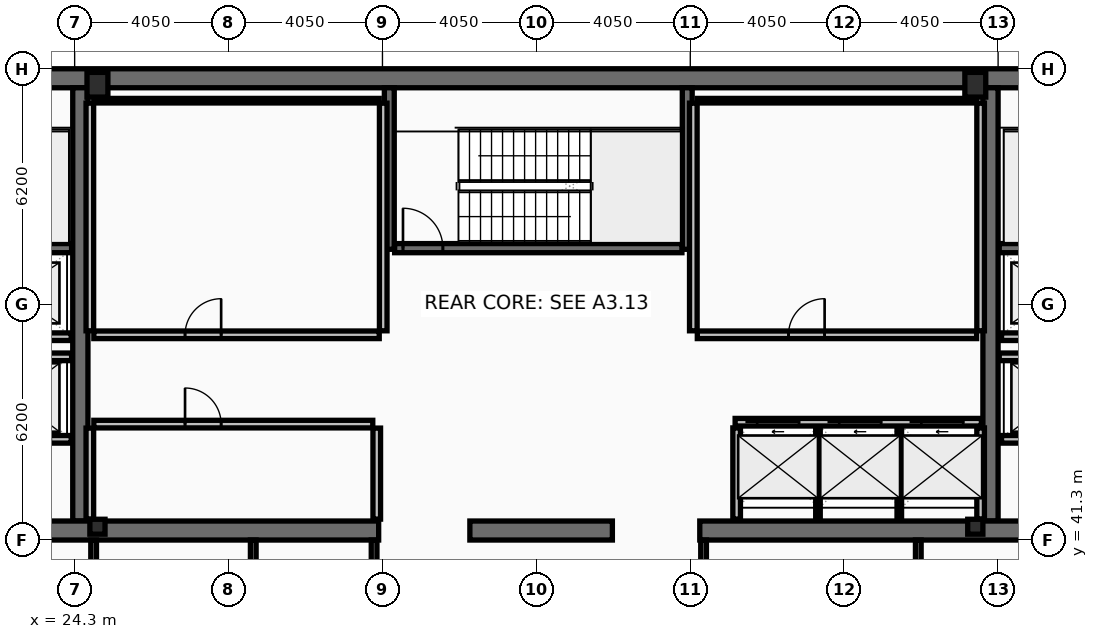
"""IFC4 building model, lengths in metres.
Left out: names, types, materials, properties, quantities, classifications, styles, units other than length and angle.
Written with IfcOpenShell. Run it as: python <this file> out.ifc"""

import sys

from ifc_helpers import new_model, si_unit, direction, frame, frame_2d, origin, origin_2d, place, context, subcontext, project, spatial, rectangle, hollow_rectangle, i_section, extrude, element, fill, save


model = new_model("IFC4")
c1 = context("Model", 3, precision=1e-05, world=origin(), true_north=direction((0.0, 1.0)))
c2 = subcontext(c1, "Body", "Model", "MODEL_VIEW")
j1 = project(units=[si_unit("LENGTHUNIT", "METRE"), si_unit("PLANEANGLEUNIT", "RADIAN")], contexts=[c1])
p1 = place(None, origin())
s1 = spatial("IfcSite", under=j1, at=p1, CompositionType="ELEMENT")
p2 = place(p1, origin())
s2 = spatial("IfcBuilding", under=s1, at=p2, CompositionType="ELEMENT")
p3 = place(p2, frame((0.0, 0.0, 305.8)))
s3 = spatial("IfcBuildingStorey", under=s2, at=p3, CompositionType="ELEMENT", Elevation=305.8)
p4 = place(p3, frame((16.2, 53.45, 0.0), z_axis=(0.0, 0.0, 1.0), x_axis=(1.0, 0.0, 0.0)))
e1 = element("IfcWall", 1, at=p4, inside=s3, PredefinedType="SHEAR", context=c2, shape_type="SweptSolid", body=[
    extrude(rectangle(XDim=40.5, YDim=0.5, at=frame_2d((20.25, 0.0))), origin(), (0.0, 0.0, 1.0), 4.24),
])
for number, where, z_axis, x_axis in (
    (2, (24.45, 41.8, 0.0), (0.0, 0.0, 1.0), (0.0, 1.0, 0.0)),
    (3, (48.4, 41.8, 0.0), (0.0, 0.0, 1.0), (0.0, 1.0, 0.0)),
):
    element("IfcWall", number, at=place(p3, frame(where, z_axis=z_axis, x_axis=x_axis)), inside=s3, PredefinedType="SHEAR", context=c2, shape_type="SweptSolid", body=[
        extrude(rectangle(XDim=11.4, YDim=0.4, at=frame_2d((5.7, 0.0))), origin(), (0.0, 0.0, 1.0), 4.24),
    ])
p5 = place(p3, frame((32.3, 41.55, 0.0), z_axis=(0.0, 0.0, 1.0), x_axis=(-1.0, 0.0, 0.0)))
e4 = element("IfcWall", 4, at=p5, inside=s3, PredefinedType="SHEAR", context=c2, shape_type="SweptSolid", body=[
    extrude(rectangle(XDim=11.45, YDim=0.5, at=frame_2d((5.725, 0.0))), origin(), (0.0, 0.0, 1.0), 4.24),
])
p6 = place(p3, frame((38.45, 41.55, 0.0), z_axis=(0.0, 0.0, 1.0), x_axis=(-1.0, 0.0, 0.0)))
e5 = element("IfcWall", 5, at=p6, inside=s3, PredefinedType="SHEAR", context=c2, shape_type="SweptSolid", body=[
    extrude(rectangle(XDim=3.75, YDim=0.5, at=frame_2d((1.875, 0.0))), origin(), (0.0, 0.0, 1.0), 4.24),
])
p7 = place(p3, frame((52.05, 41.55, 0.0), z_axis=(0.0, 0.0, 1.0), x_axis=(-1.0, 0.0, 0.0)))
e6 = element("IfcWall", 6, at=p7, inside=s3, PredefinedType="SHEAR", context=c2, shape_type="SweptSolid", body=[
    extrude(rectangle(XDim=11.3, YDim=0.5, at=frame_2d((5.65, 0.0))), origin(), (0.0, 0.0, 1.0), 4.24),
])
for number, where, z_axis, x_axis in (
    (7, (32.58, 48.95, 0.0), (0.0, 0.0, 1.0), (0.0, 1.0, 0.0)),
    (8, (40.42, 48.95, 0.0), (0.0, 0.0, 1.0), (0.0, 1.0, 0.0)),
):
    element("IfcWall", number, at=place(p3, frame(where, z_axis=z_axis, x_axis=x_axis)), inside=s3, PredefinedType="SHEAR", context=c2, shape_type="SweptSolid", body=[
        extrude(rectangle(XDim=4.25, YDim=0.26, at=frame_2d((2.125, 0.0))), origin(), (0.0, 0.0, 1.0), 4.24),
    ])
p8 = place(p3, frame((16.7, 48.98, 0.0), z_axis=(0.0, 0.0, 1.0), x_axis=(1.0, 0.0, 0.0)))
e9 = element("IfcWall", 9, at=p8, inside=s3, PredefinedType="SHEAR", context=c2, shape_type="SweptSolid", body=[
    extrude(rectangle(XDim=7.52, YDim=0.24, at=frame_2d((3.76, 0.0))), origin(), (0.0, 0.0, 1.0), 4.24),
])
p9 = place(p8, frame((0.22, 0.0, 0.0)))
e10 = element("IfcOpeningElement", 10, at=p9, cuts=e9, PredefinedType="OPENING", context=c2, shape_type="SweptSolid", body=[
    extrude(rectangle(XDim=1.05, YDim=2.15, at=frame_2d((0.525, 1.075))), frame((0.0, 0.13, 0.0), z_axis=(0.0, -1.0, 0.0), x_axis=(1.0, 0.0, 0.0)), (0.0, 0.0, 1.0), 0.26),
])
p10 = place(p3, frame((48.63, 48.98, 0.0), z_axis=(0.0, 0.0, 1.0), x_axis=(1.0, 0.0, 0.0)))
e11 = element("IfcWall", 11, at=p10, inside=s3, PredefinedType="SHEAR", context=c2, shape_type="SweptSolid", body=[
    extrude(rectangle(XDim=7.57, YDim=0.24, at=frame_2d((3.785, 0.0))), origin(), (0.0, 0.0, 1.0), 4.24),
])
p11 = place(p10, frame((6.3, 0.0, 0.0)))
e12 = element("IfcOpeningElement", 12, at=p11, cuts=e11, PredefinedType="OPENING", context=c2, shape_type="SweptSolid", body=[
    extrude(rectangle(XDim=1.05, YDim=2.15, at=frame_2d((0.525, 1.075))), frame((0.0, 0.13, 0.0), z_axis=(0.0, -1.0, 0.0), x_axis=(1.0, 0.0, 0.0)), (0.0, 0.0, 1.0), 0.26),
])
p12 = place(p3, frame((32.72, 48.98, 0.0), z_axis=(0.0, 0.0, 1.0), x_axis=(1.0, 0.0, 0.0)))
e13 = element("IfcWall", 13, at=p12, inside=s3, PredefinedType="SHEAR", context=c2, shape_type="SweptSolid", body=[
    extrude(rectangle(XDim=7.56, YDim=0.24, at=frame_2d((3.78, 0.0))), origin(), (0.0, 0.0, 1.0), 4.24),
])
p13 = place(p12, frame((0.22, 0.0, 0.0)))
e14 = element("IfcOpeningElement", 14, at=p13, cuts=e13, PredefinedType="OPENING", context=c2, shape_type="SweptSolid", body=[
    extrude(rectangle(XDim=1.05, YDim=2.15, at=frame_2d((0.525, 1.075))), frame((0.0, 0.13, 0.0), z_axis=(0.0, -1.0, 0.0), x_axis=(1.0, 0.0, 0.0)), (0.0, 0.0, 1.0), 0.26),
])
for number, where, z_axis, x_axis in (
    (15, (24.9, 53.28, 0.0), (0.0, 0.0, 1.0), (1.0, 0.0, 0.0)),
    (16, (48.0, 53.28, 0.0), (0.0, 0.0, 1.0), (1.0, 0.0, 0.0)),
):
    element("IfcColumn", number, at=place(p3, frame(where, z_axis=z_axis, x_axis=x_axis)), inside=s3, PredefinedType="COLUMN", context=c2, shape_type="SweptSolid", body=[
        extrude(hollow_rectangle(XDim=0.55, YDim=0.65, WallThickness=0.04, at=origin_2d()), origin(), (0.0, 0.0, 1.0), 4.4),
    ])
for number, where, z_axis, x_axis in (
    (17, (24.9, 41.65, 0.0), (0.0, 0.0, 1.0), (1.0, 0.0, 0.0)),
    (18, (48.0, 41.65, 0.0), (0.0, 0.0, 1.0), (1.0, 0.0, 0.0)),
):
    element("IfcColumn", number, at=place(p3, frame(where, z_axis=z_axis, x_axis=x_axis)), inside=s3, PredefinedType="COLUMN", context=c2, shape_type="SweptSolid", body=[
        extrude(i_section(OverallWidth=0.399, OverallDepth=0.393, WebThickness=0.023, FlangeThickness=0.037, at=origin_2d()), origin(), (0.0, 0.0, 1.0), 4.4),
    ])
p14 = place(p3, frame((41.68, 44.4, 0.0), z_axis=(0.0, 0.0, 1.0), x_axis=(1.0, 0.0, 0.0)))
e19 = element("IfcWall", 19, at=p14, inside=s3, PredefinedType="PARTITIONING", context=c2, shape_type="SweptSolid", body=[
    extrude(rectangle(XDim=6.48, YDim=0.2, at=frame_2d((3.24, 0.0))), origin(), (0.0, 0.0, 1.0), 4.24),
])
p15 = place(p14, frame((0.58, 0.0, 0.0)))
e20 = element("IfcOpeningElement", 20, at=p15, cuts=e19, PredefinedType="OPENING", context=c2, shape_type="SweptSolid", body=[
    extrude(rectangle(XDim=1.1, YDim=2.18, at=frame_2d((0.55, 1.09))), frame((0.0, 0.11, 0.0), z_axis=(0.0, -1.0, 0.0), x_axis=(1.0, 0.0, 0.0)), (0.0, 0.0, 1.0), 0.22),
])
p16 = place(p14, frame((2.74, 0.0, 0.0)))
e21 = element("IfcOpeningElement", 21, at=p16, cuts=e19, PredefinedType="OPENING", context=c2, shape_type="SweptSolid", body=[
    extrude(rectangle(XDim=1.1, YDim=2.18, at=frame_2d((0.55, 1.09))), frame((0.0, 0.11, 0.0), z_axis=(0.0, -1.0, 0.0), x_axis=(1.0, 0.0, 0.0)), (0.0, 0.0, 1.0), 0.22),
])
p17 = place(p14, frame((4.9, 0.0, 0.0)))
e22 = element("IfcOpeningElement", 22, at=p17, cuts=e19, PredefinedType="OPENING", context=c2, shape_type="SweptSolid", body=[
    extrude(rectangle(XDim=1.1, YDim=2.18, at=frame_2d((0.55, 1.09))), frame((0.0, 0.11, 0.0), z_axis=(0.0, -1.0, 0.0), x_axis=(1.0, 0.0, 0.0)), (0.0, 0.0, 1.0), 0.22),
])
p18 = place(p3, frame((51.61, 43.95, 0.0), z_axis=(0.0, 0.0, 1.0), x_axis=(-1.0, 0.0, 0.0)))
e23 = element("IfcWall", 23, at=p18, inside=s3, PredefinedType="PARTITIONING", context=c2, shape_type="SweptSolid", body=[
    extrude(rectangle(XDim=2.92, YDim=0.2, at=frame_2d((1.46, 0.0))), origin(), (0.0, 0.0, 1.0), 4.24),
])
p19 = place(p18, frame((0.81, 0.0, 0.0)))
e24 = element("IfcOpeningElement", 24, at=p19, cuts=e23, PredefinedType="OPENING", context=c2, shape_type="SweptSolid", body=[
    extrude(rectangle(XDim=1.3, YDim=2.18, at=frame_2d((0.65, 1.09))), frame((0.0, 0.11, 0.0), z_axis=(0.0, -1.0, 0.0), x_axis=(1.0, 0.0, 0.0)), (0.0, 0.0, 1.0), 0.22),
])
p20 = place(p3, frame((24.21, 43.95, 0.0), z_axis=(0.0, 0.0, 1.0), x_axis=(-1.0, 0.0, 0.0)))
e25 = element("IfcWall", 25, at=p20, inside=s3, PredefinedType="PARTITIONING", context=c2, shape_type="SweptSolid", body=[
    extrude(rectangle(XDim=2.97, YDim=0.2, at=frame_2d((1.485, 0.0))), origin(), (0.0, 0.0, 1.0), 4.24),
])
p21 = place(p20, frame((0.86, 0.0, 0.0)))
e26 = element("IfcOpeningElement", 26, at=p21, cuts=e25, PredefinedType="OPENING", context=c2, shape_type="SweptSolid", body=[
    extrude(rectangle(XDim=1.3, YDim=2.18, at=frame_2d((0.65, 1.09))), frame((0.0, 0.11, 0.0), z_axis=(0.0, -1.0, 0.0), x_axis=(1.0, 0.0, 0.0)), (0.0, 0.0, 1.0), 0.22),
])
p22 = place(p3, frame((51.61, 46.65, 0.0), z_axis=(0.0, 0.0, 1.0), x_axis=(-1.0, 0.0, 0.0)))
e27 = element("IfcWall", 27, at=p22, inside=s3, PredefinedType="PARTITIONING", context=c2, shape_type="SweptSolid", body=[
    extrude(rectangle(XDim=2.92, YDim=0.2, at=frame_2d((1.46, 0.0))), origin(), (0.0, 0.0, 1.0), 4.24),
])
p23 = place(p22, frame((0.86, 0.0, 0.0)))
e28 = element("IfcOpeningElement", 28, at=p23, cuts=e27, PredefinedType="OPENING", context=c2, shape_type="SweptSolid", body=[
    extrude(rectangle(XDim=1.2, YDim=2.18, at=frame_2d((0.6, 1.09))), frame((0.0, 0.11, 0.0), z_axis=(0.0, -1.0, 0.0), x_axis=(1.0, 0.0, 0.0)), (0.0, 0.0, 1.0), 0.22),
])
p24 = place(p3, frame((24.21, 46.65, 0.0), z_axis=(0.0, 0.0, 1.0), x_axis=(-1.0, 0.0, 0.0)))
e29 = element("IfcWall", 29, at=p24, inside=s3, PredefinedType="PARTITIONING", context=c2, shape_type="SweptSolid", body=[
    extrude(rectangle(XDim=2.97, YDim=0.2, at=frame_2d((1.485, 0.0))), origin(), (0.0, 0.0, 1.0), 4.24),
])
p25 = place(p24, frame((0.91, 0.0, 0.0)))
e30 = element("IfcOpeningElement", 30, at=p25, cuts=e29, PredefinedType="OPENING", context=c2, shape_type="SweptSolid", body=[
    extrude(rectangle(XDim=1.2, YDim=2.18, at=frame_2d((0.6, 1.09))), frame((0.0, 0.11, 0.0), z_axis=(0.0, -1.0, 0.0), x_axis=(1.0, 0.0, 0.0)), (0.0, 0.0, 1.0), 0.22),
])
p26 = place(p3, frame((21.2, 46.12, 0.0), z_axis=(0.0, 0.0, 1.0), x_axis=(1.0, 0.0, 0.0)))
e31 = element("IfcWall", 31, at=p26, inside=s3, PredefinedType="PARTITIONING", context=c2, shape_type="SweptSolid", body=[
    extrude(rectangle(XDim=3.02, YDim=0.2, at=frame_2d((1.51, 0.0))), origin(), (0.0, 0.0, 1.0), 4.24),
])
p27 = place(p3, frame((48.63, 46.12, 0.0), z_axis=(0.0, 0.0, 1.0), x_axis=(1.0, 0.0, 0.0)))
e32 = element("IfcWall", 32, at=p27, inside=s3, PredefinedType="PARTITIONING", context=c2, shape_type="SweptSolid", body=[
    extrude(rectangle(XDim=3.07, YDim=0.2, at=frame_2d((1.535, 0.0))), origin(), (0.0, 0.0, 1.0), 4.24),
])
for number, where, z_axis, x_axis in (
    (33, (24.7, 46.805, 0.0), (0.0, 0.0, 1.0), (0.0, 1.0, 0.0)),
    (34, (32.42, 46.805, 0.0), (0.0, 0.0, 1.0), (0.0, 1.0, 0.0)),
):
    element("IfcWall", number, at=place(p3, frame(where, z_axis=z_axis, x_axis=x_axis)), inside=s3, PredefinedType="PARTITIONING", context=c2, shape_type="SweptSolid", body=[
        extrude(rectangle(XDim=5.99, YDim=0.2, at=frame_2d((2.995, 0.0))), origin(), (0.0, 0.0, 1.0), 4.24),
    ])
p28 = place(p3, frame((24.805, 52.86, 0.0), z_axis=(0.0, 0.0, 1.0), x_axis=(1.0, 0.0, 0.0)))
e35 = element("IfcWall", 35, at=p28, inside=s3, PredefinedType="PARTITIONING", context=c2, shape_type="SweptSolid", body=[
    extrude(rectangle(XDim=7.51, YDim=0.12, at=frame_2d((3.755, 0.0))), origin(), (0.0, 0.0, 1.0), 4.24),
])
p29 = place(p3, frame((24.805, 46.7, 0.0), z_axis=(0.0, 0.0, 1.0), x_axis=(1.0, 0.0, 0.0)))
e36 = element("IfcWall", 36, at=p29, inside=s3, PredefinedType="PARTITIONING", context=c2, shape_type="SweptSolid", body=[
    extrude(rectangle(XDim=7.51, YDim=0.2, at=frame_2d((3.755, 0.0))), origin(), (0.0, 0.0, 1.0), 4.24),
])
p30 = place(p29, frame((2.4, 0.0, 0.0)))
e37 = element("IfcOpeningElement", 37, at=p30, cuts=e36, PredefinedType="OPENING", context=c2, shape_type="SweptSolid", body=[
    extrude(rectangle(XDim=0.95, YDim=2.1, at=frame_2d((0.475, 1.05))), frame((0.0, 0.11, 0.0), z_axis=(0.0, -1.0, 0.0), x_axis=(1.0, 0.0, 0.0)), (0.0, 0.0, 1.0), 0.22),
])
for number, where, z_axis, x_axis in (
    (38, (24.7, 41.85, 0.0), (0.0, 0.0, 1.0), (0.0, 1.0, 0.0)),
    (39, (32.25, 41.85, 0.0), (0.0, 0.0, 1.0), (0.0, 1.0, 0.0)),
):
    element("IfcWall", number, at=place(p3, frame(where, z_axis=z_axis, x_axis=x_axis)), inside=s3, PredefinedType="PARTITIONING", context=c2, shape_type="SweptSolid", body=[
        extrude(rectangle(XDim=2.395, YDim=0.2, at=frame_2d((1.198, 0.0))), origin(), (0.0, 0.0, 1.0), 4.24),
    ])
p31 = place(p3, frame((24.805, 44.35, 0.0), z_axis=(0.0, 0.0, 1.0), x_axis=(1.0, 0.0, 0.0)))
e40 = element("IfcWall", 40, at=p31, inside=s3, PredefinedType="PARTITIONING", context=c2, shape_type="SweptSolid", body=[
    extrude(rectangle(XDim=7.34, YDim=0.2, at=frame_2d((3.67, 0.0))), origin(), (0.0, 0.0, 1.0), 4.24),
])
p32 = place(p31, frame((2.4, 0.0, 0.0)))
e41 = element("IfcOpeningElement", 41, at=p32, cuts=e40, PredefinedType="OPENING", context=c2, shape_type="SweptSolid", body=[
    extrude(rectangle(XDim=0.95, YDim=2.1, at=frame_2d((0.475, 1.05))), frame((0.0, 0.11, 0.0), z_axis=(0.0, -1.0, 0.0), x_axis=(1.0, 0.0, 0.0)), (0.0, 0.0, 1.0), 0.22),
])
for number, where, z_axis, x_axis in (
    (42, (40.58, 46.805, 0.0), (0.0, 0.0, 1.0), (0.0, 1.0, 0.0)),
    (43, (48.14, 46.805, 0.0), (0.0, 0.0, 1.0), (0.0, 1.0, 0.0)),
):
    element("IfcWall", number, at=place(p3, frame(where, z_axis=z_axis, x_axis=x_axis)), inside=s3, PredefinedType="PARTITIONING", context=c2, shape_type="SweptSolid", body=[
        extrude(rectangle(XDim=5.99, YDim=0.2, at=frame_2d((2.995, 0.0))), origin(), (0.0, 0.0, 1.0), 4.24),
    ])
p33 = place(p3, frame((40.685, 52.86, 0.0), z_axis=(0.0, 0.0, 1.0), x_axis=(1.0, 0.0, 0.0)))
e44 = element("IfcWall", 44, at=p33, inside=s3, PredefinedType="PARTITIONING", context=c2, shape_type="SweptSolid", body=[
    extrude(rectangle(XDim=7.35, YDim=0.12, at=frame_2d((3.675, 0.0))), origin(), (0.0, 0.0, 1.0), 4.24),
])
p34 = place(p3, frame((40.685, 46.7, 0.0), z_axis=(0.0, 0.0, 1.0), x_axis=(1.0, 0.0, 0.0)))
e45 = element("IfcWall", 45, at=p34, inside=s3, PredefinedType="PARTITIONING", context=c2, shape_type="SweptSolid", body=[
    extrude(rectangle(XDim=7.35, YDim=0.2, at=frame_2d((3.675, 0.0))), origin(), (0.0, 0.0, 1.0), 4.24),
])
p35 = place(p34, frame((2.4, 0.0, 0.0)))
e46 = element("IfcOpeningElement", 46, at=p35, cuts=e45, PredefinedType="OPENING", context=c2, shape_type="SweptSolid", body=[
    extrude(rectangle(XDim=0.95, YDim=2.1, at=frame_2d((0.475, 1.05))), frame((0.0, 0.11, 0.0), z_axis=(0.0, -1.0, 0.0), x_axis=(1.0, 0.0, 0.0)), (0.0, 0.0, 1.0), 0.22),
])
for number, where, z_axis, x_axis in (
    (47, (41.72, 41.85, 0.0), (0.0, 0.0, 1.0), (0.0, 1.0, 0.0)),
    (48, (48.14, 41.85, 0.0), (0.0, 0.0, 1.0), (0.0, 1.0, 0.0)),
):
    element("IfcWall", number, at=place(p3, frame(where, z_axis=z_axis, x_axis=x_axis)), inside=s3, PredefinedType="PARTITIONING", context=c2, shape_type="SweptSolid", body=[
        extrude(rectangle(XDim=2.4, YDim=0.2, at=frame_2d((1.2, 0.0))), origin(), (0.0, 0.0, 1.0), 4.24),
    ])
for number, where, z_axis, x_axis in (
    (49, (43.86, 41.85, 0.0), (0.0, 0.0, 1.0), (0.0, 1.0, 0.0)),
    (50, (46.0, 41.85, 0.0), (0.0, 0.0, 1.0), (0.0, 1.0, 0.0)),
):
    element("IfcWall", number, at=place(p3, frame(where, z_axis=z_axis, x_axis=x_axis)), inside=s3, PredefinedType="PARTITIONING", context=c2, shape_type="SweptSolid", body=[
        extrude(rectangle(XDim=2.4, YDim=0.12, at=frame_2d((1.2, 0.0))), origin(), (0.0, 0.0, 1.0), 4.24),
    ])
p36 = place(p3, frame((24.8, 38.28, 0.0), z_axis=(0.0, 0.0, 1.0), x_axis=(0.0, 1.0, 0.0)))
e51 = element("IfcWall", 51, at=p36, inside=s3, PredefinedType="PARTITIONING", context=c2, shape_type="SweptSolid", body=[
    extrude(rectangle(XDim=3.02, YDim=0.15, at=frame_2d((1.51, 0.0))), origin(), (0.0, 0.0, 1.0), 3.58),
])
for number, where, z_axis, x_axis in (
    (52, (29.0, 38.28, 0.0), (0.0, 0.0, 1.0), (0.0, 1.0, 0.0)),
    (53, (32.18, 38.28, 0.0), (0.0, 0.0, 1.0), (0.0, 1.0, 0.0)),
    (54, (40.85, 38.28, 0.0), (0.0, 0.0, 1.0), (0.0, 1.0, 0.0)),
    (55, (46.5, 38.28, 0.0), (0.0, 0.0, 1.0), (0.0, 1.0, 0.0)),
):
    element("IfcWall", number, at=place(p3, frame(where, z_axis=z_axis, x_axis=x_axis)), inside=s3, PredefinedType="PARTITIONING", context=c2, shape_type="SweptSolid", body=[
        extrude(rectangle(XDim=3.02, YDim=0.15, at=frame_2d((1.51, 0.0))), origin(), (0.0, 0.0, 1.0), 4.24),
    ])
p37 = place(p13, origin())
e56 = element("IfcDoor", 56, at=p37, inside=s3, OperationType="SINGLE_SWING_LEFT", PredefinedType="DOOR", context=c2, shape_type="SweptSolid", body=[
    extrude(rectangle(XDim=1.05, YDim=2.15, at=frame_2d((0.525, 1.075))), frame((0.0, 0.025, 0.0), z_axis=(0.0, -1.0, 0.0), x_axis=(1.0, 0.0, 0.0)), (0.0, 0.0, 1.0), 0.05),
])
fill(e14, e56)
p38 = place(p15, origin())
e57 = element("IfcDoor", 57, at=p38, inside=s3, OperationType="SLIDING_TO_LEFT", PredefinedType="DOOR", context=c2, shape_type="SweptSolid", body=[
    extrude(rectangle(XDim=1.1, YDim=2.18, at=frame_2d((0.55, 1.09))), frame((0.0, 0.025, 0.0), z_axis=(0.0, -1.0, 0.0), x_axis=(1.0, 0.0, 0.0)), (0.0, 0.0, 1.0), 0.05),
])
fill(e20, e57)
p39 = place(p16, origin())
e58 = element("IfcDoor", 58, at=p39, inside=s3, OperationType="SLIDING_TO_LEFT", PredefinedType="DOOR", context=c2, shape_type="SweptSolid", body=[
    extrude(rectangle(XDim=1.1, YDim=2.18, at=frame_2d((0.55, 1.09))), frame((0.0, 0.025, 0.0), z_axis=(0.0, -1.0, 0.0), x_axis=(1.0, 0.0, 0.0)), (0.0, 0.0, 1.0), 0.05),
])
fill(e21, e58)
p40 = place(p17, origin())
e59 = element("IfcDoor", 59, at=p40, inside=s3, OperationType="SLIDING_TO_LEFT", PredefinedType="DOOR", context=c2, shape_type="SweptSolid", body=[
    extrude(rectangle(XDim=1.1, YDim=2.18, at=frame_2d((0.55, 1.09))), frame((0.0, 0.025, 0.0), z_axis=(0.0, -1.0, 0.0), x_axis=(1.0, 0.0, 0.0)), (0.0, 0.0, 1.0), 0.05),
])
fill(e22, e59)
p41 = place(p30, origin())
e60 = element("IfcDoor", 60, at=p41, inside=s3, OperationType="SINGLE_SWING_RIGHT", PredefinedType="DOOR", context=c2, shape_type="SweptSolid", body=[
    extrude(rectangle(XDim=0.95, YDim=2.1, at=frame_2d((0.475, 1.05))), frame((0.0, 0.025, 0.0), z_axis=(0.0, -1.0, 0.0), x_axis=(1.0, 0.0, 0.0)), (0.0, 0.0, 1.0), 0.05),
])
fill(e37, e60)
p42 = place(p32, origin())
e61 = element("IfcDoor", 61, at=p42, inside=s3, OperationType="SINGLE_SWING_LEFT", PredefinedType="DOOR", context=c2, shape_type="SweptSolid", body=[
    extrude(rectangle(XDim=0.95, YDim=2.1, at=frame_2d((0.475, 1.05))), frame((0.0, 0.025, 0.0), z_axis=(0.0, -1.0, 0.0), x_axis=(1.0, 0.0, 0.0)), (0.0, 0.0, 1.0), 0.05),
])
fill(e41, e61)
p43 = place(p35, origin())
e62 = element("IfcDoor", 62, at=p43, inside=s3, OperationType="SINGLE_SWING_RIGHT", PredefinedType="DOOR", context=c2, shape_type="SweptSolid", body=[
    extrude(rectangle(XDim=0.95, YDim=2.1, at=frame_2d((0.475, 1.05))), frame((0.0, 0.025, 0.0), z_axis=(0.0, -1.0, 0.0), x_axis=(1.0, 0.0, 0.0)), (0.0, 0.0, 1.0), 0.05),
])
fill(e46, e62)
save(model, sys.argv[1])
